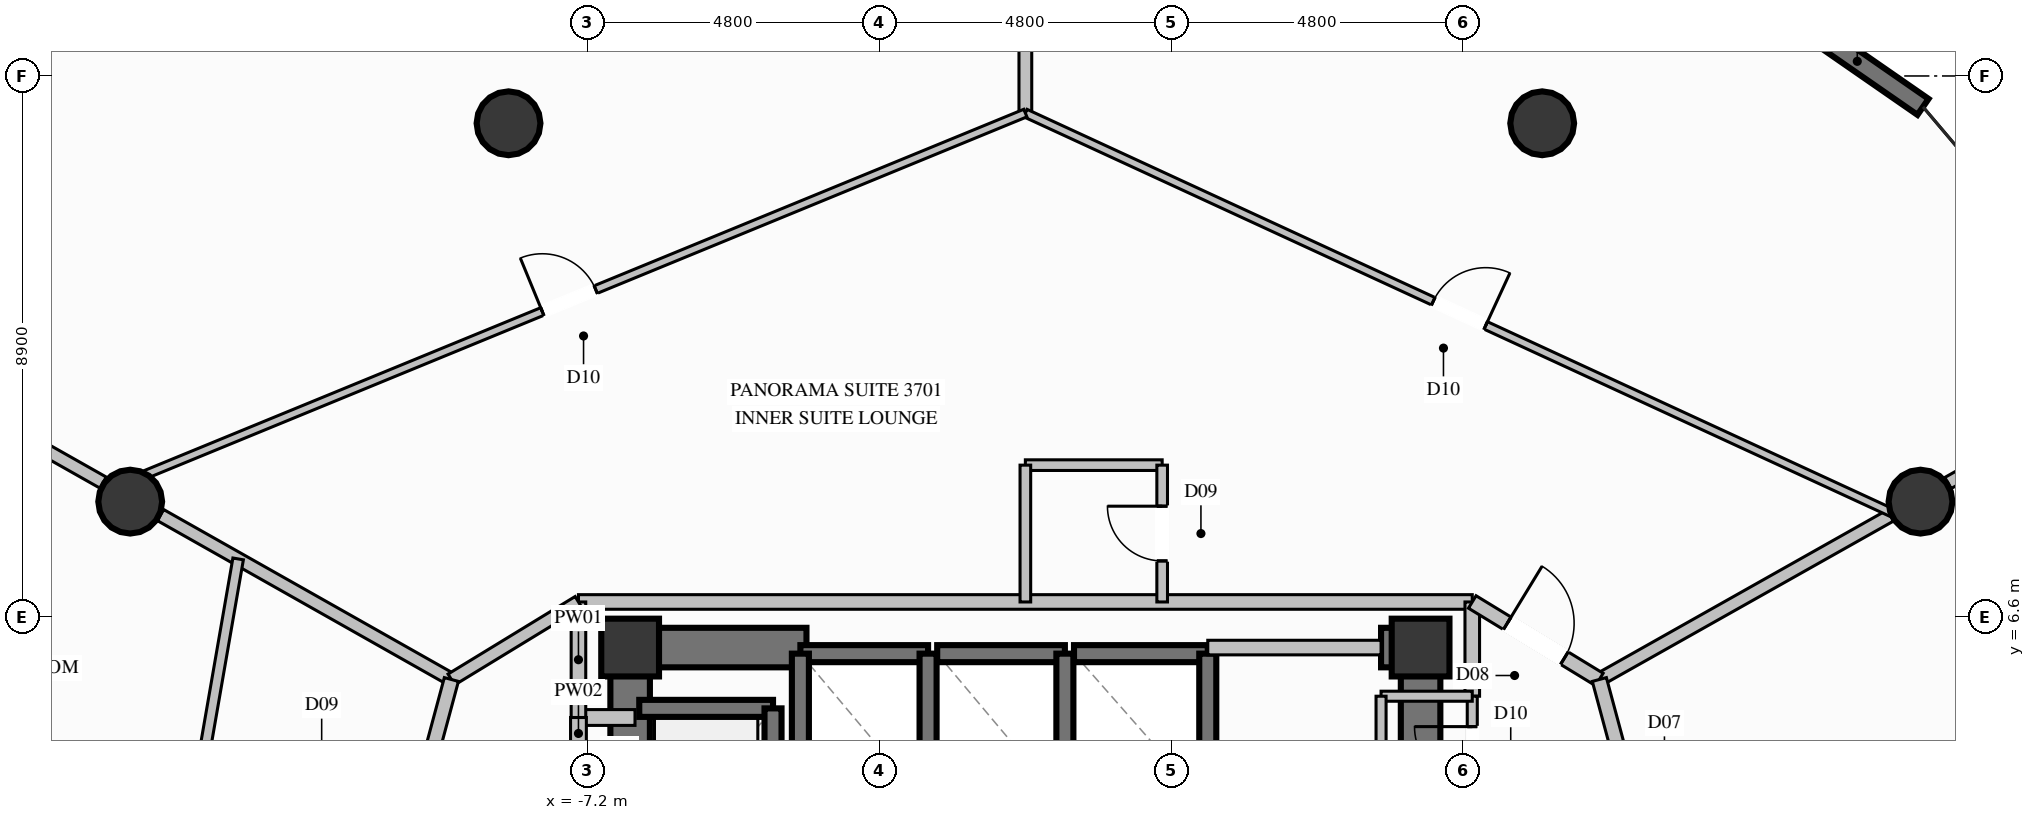
"""IFC4 building model, lengths in metres.
Left out: names, types, materials, properties, quantities, classifications, styles, units other than length and angle.
Written with IfcOpenShell. Run it as: python <this file> out.ifc"""

import sys

from ifc_helpers import new_model, si_unit, direction, frame, frame_2d, origin, origin_2d, place, context, subcontext, project, spatial, rectangle, circle, extrude, element, fill, save


model = new_model("IFC4")
c1 = context("Model", 3, precision=1e-05, world=origin(), true_north=direction((0.0, 1.0)))
c2 = subcontext(c1, "Body", "Model", "MODEL_VIEW")
j1 = project(units=[si_unit("LENGTHUNIT", "METRE"), si_unit("PLANEANGLEUNIT", "RADIAN")], contexts=[c1])
p1 = place(None, origin())
s1 = spatial("IfcSite", under=j1, at=p1, CompositionType="ELEMENT")
p2 = place(p1, origin())
s2 = spatial("IfcBuilding", under=s1, at=p2, CompositionType="ELEMENT")
p3 = place(p2, frame((0.0, 0.0, 138.6)))
s3 = spatial("IfcBuildingStorey", under=s2, at=p3, CompositionType="ELEMENT", Elevation=138.6)
for number, where, z_axis, x_axis in (
    (1, (6.5, 6.1, 0.0), (0.0, 0.0, 1.0), (1.0, 0.0, 0.0)),
    (2, (-6.5, 6.1, 0.0), (0.0, 0.0, 1.0), (1.0, 0.0, 0.0)),
):
    element("IfcColumn", number, at=place(p3, frame(where, z_axis=z_axis, x_axis=x_axis)), inside=s3, PredefinedType="COLUMN", context=c2, shape_type="SweptSolid", body=[
        extrude(rectangle(XDim=0.95, YDim=0.95, at=origin_2d()), origin(), (0.0, 0.0, 1.0), 3.6),
    ])
p4 = place(p3, frame((-6.175, 6.1, 0.0), z_axis=(0.0, 0.0, 1.0), x_axis=(1.0, 0.0, 0.0)))
e3 = element("IfcWall", 3, at=p4, inside=s3, PredefinedType="SHEAR", context=c2, shape_type="SweptSolid", body=[
    extrude(rectangle(XDim=2.575, YDim=0.65, at=frame_2d((1.288, 0.0))), origin(), (0.0, 0.0, 1.0), 3.6),
])
p5 = place(p3, frame((5.85, 6.1, 0.0), z_axis=(0.0, 0.0, 1.0), x_axis=(1.0, 0.0, 0.0)))
e4 = element("IfcWall", 4, at=p5, inside=s3, PredefinedType="SHEAR", context=c2, shape_type="SweptSolid", body=[
    extrude(rectangle(XDim=0.325, YDim=0.65, at=frame_2d((0.163, 0.0))), origin(), (0.0, 0.0, 1.0), 3.6),
])
p6 = place(p3, frame((-6.5, 2.35, 0.0), z_axis=(0.0, 0.0, 1.0), x_axis=(0.0, 1.0, 0.0)))
e5 = element("IfcWall", 5, at=p6, inside=s3, PredefinedType="SHEAR", context=c2, shape_type="SweptSolid", body=[
    extrude(rectangle(XDim=4.075, YDim=0.65, at=frame_2d((2.038, 0.0))), origin(), (0.0, 0.0, 1.0), 3.6),
])
p7 = place(p3, frame((6.5, 3.35, 0.0), z_axis=(0.0, 0.0, 1.0), x_axis=(0.0, 1.0, 0.0)))
e6 = element("IfcWall", 6, at=p7, inside=s3, PredefinedType="SHEAR", context=c2, shape_type="SweptSolid", body=[
    extrude(rectangle(XDim=3.075, YDim=0.65, at=frame_2d((1.538, 0.0))), origin(), (0.0, 0.0, 1.0), 3.6),
])
for number, where, z_axis, x_axis in (
    (7, (14.722, 8.5, 0.0), (0.0, 0.0, 1.0), (1.0, 0.0, 0.0)),
    (8, (8.5, 14.722, 0.0), (0.0, 0.0, 1.0), (1.0, 0.0, 0.0)),
    (9, (-8.5, 14.722, 0.0), (0.0, 0.0, 1.0), (1.0, 0.0, 0.0)),
    (10, (-14.722, 8.5, 0.0), (0.0, 0.0, 1.0), (1.0, 0.0, 0.0)),
):
    element("IfcColumn", number, at=place(p3, frame(where, z_axis=z_axis, x_axis=x_axis)), inside=s3, PredefinedType="COLUMN", context=c2, shape_type="SweptSolid", body=[
        extrude(circle(Radius=0.525, at=origin_2d()), origin(), (0.0, 0.0, 1.0), 3.6),
    ])
p8 = place(p3, frame((8.549, 19.296, 0.0), z_axis=(0.0, 0.0, 1.0), x_axis=(0.822065431331, -0.569393033511, 0.0)))
e11 = element("IfcWall", 11, at=p8, inside=s3, PredefinedType="SOLIDWALL", context=c2, shape_type="SweptSolid", body=[
    extrude(rectangle(XDim=7.559, YDim=0.32, at=frame_2d((3.779, 0.0))), origin(), (0.0, 0.0, 1.0), 3.35),
])
p9 = place(p8, frame((2.879, 0.0, 0.35)))
e12 = element("IfcOpeningElement", 12, at=p9, cuts=e11, PredefinedType="OPENING", context=c2, shape_type="SweptSolid", body=[
    extrude(rectangle(XDim=1.8, YDim=2.6, at=frame_2d((0.9, 1.3))), frame((0.0, 0.17, 0.0), z_axis=(0.0, -1.0, 0.0), x_axis=(1.0, 0.0, 0.0)), (0.0, 0.0, 1.0), 0.34),
])
p10 = place(p3, frame((-1.6, 6.0, 0.0), z_axis=(0.0, 0.0, 1.0), x_axis=(-1.0, 0.0, 0.0)))
e13 = element("IfcWall", 13, at=p10, inside=s3, PredefinedType="SOLIDWALL", context=c2, shape_type="SweptSolid", body=[
    extrude(rectangle(XDim=2.1, YDim=0.28, at=frame_2d((1.05, 0.0))), origin(), (0.0, 0.0, 1.0), 3.35),
])
for number, where, z_axis, x_axis in (
    (14, (-3.7, 6.0, 0.0), (0.0, 0.0, 1.0), (0.0, -1.0, 0.0)),
    (15, (-1.6, 3.5, 0.0), (0.0, 0.0, 1.0), (0.0, 1.0, 0.0)),
):
    element("IfcWall", number, at=place(p3, frame(where, z_axis=z_axis, x_axis=x_axis)), inside=s3, PredefinedType="SOLIDWALL", context=c2, shape_type="SweptSolid", body=[
        extrude(rectangle(XDim=2.5, YDim=0.28, at=frame_2d((1.25, 0.0))), origin(), (0.0, 0.0, 1.0), 3.35),
    ])
p11 = place(p3, frame((0.65, 6.0, 0.0), z_axis=(0.0, 0.0, 1.0), x_axis=(-1.0, 0.0, 0.0)))
e16 = element("IfcWall", 16, at=p11, inside=s3, PredefinedType="SOLIDWALL", context=c2, shape_type="SweptSolid", body=[
    extrude(rectangle(XDim=2.1, YDim=0.28, at=frame_2d((1.05, 0.0))), origin(), (0.0, 0.0, 1.0), 3.35),
])
p12 = place(p3, frame((0.65, 3.5, 0.0), z_axis=(0.0, 0.0, 1.0), x_axis=(0.0, 1.0, 0.0)))
e17 = element("IfcWall", 17, at=p12, inside=s3, PredefinedType="SOLIDWALL", context=c2, shape_type="SweptSolid", body=[
    extrude(rectangle(XDim=2.5, YDim=0.28, at=frame_2d((1.25, 0.0))), origin(), (0.0, 0.0, 1.0), 3.35),
])
p13 = place(p3, frame((3.0, 6.0, 0.0), z_axis=(0.0, 0.0, 1.0), x_axis=(-1.0, 0.0, 0.0)))
e18 = element("IfcWall", 18, at=p13, inside=s3, PredefinedType="SOLIDWALL", context=c2, shape_type="SweptSolid", body=[
    extrude(rectangle(XDim=2.2, YDim=0.28, at=frame_2d((1.1, 0.0))), origin(), (0.0, 0.0, 1.0), 3.35),
])
p14 = place(p3, frame((3.0, 3.5, 0.0), z_axis=(0.0, 0.0, 1.0), x_axis=(0.0, 1.0, 0.0)))
e19 = element("IfcWall", 19, at=p14, inside=s3, PredefinedType="SOLIDWALL", context=c2, shape_type="SweptSolid", body=[
    extrude(rectangle(XDim=2.5, YDim=0.28, at=frame_2d((1.25, 0.0))), origin(), (0.0, 0.0, 1.0), 3.35),
])
p15 = place(p3, frame((-4.15, 5.1, 0.0), z_axis=(0.0, 0.0, 1.0), x_axis=(-1.0, 0.0, 0.0)))
e20 = element("IfcWall", 20, at=p15, inside=s3, PredefinedType="SOLIDWALL", context=c2, shape_type="SweptSolid", body=[
    extrude(rectangle(XDim=2.2, YDim=0.28, at=frame_2d((1.1, 0.0))), origin(), (0.0, 0.0, 1.0), 3.35),
])
p16 = place(p3, frame((-4.15, 2.4, 0.0), z_axis=(0.0, 0.0, 1.0), x_axis=(0.0, 1.0, 0.0)))
e21 = element("IfcWall", 21, at=p16, inside=s3, PredefinedType="SOLIDWALL", context=c2, shape_type="SweptSolid", body=[
    extrude(rectangle(XDim=2.7, YDim=0.28, at=frame_2d((1.35, 0.0))), origin(), (0.0, 0.0, 1.0), 3.35),
])
p17 = place(p3, frame((-7.35, 4.95, 0.0), z_axis=(0.0, 0.0, 1.0), x_axis=(1.0, 0.0, 0.0)))
e22 = element("IfcWall", 22, at=p17, inside=s3, PredefinedType="PARTITIONING", context=c2, shape_type="SweptSolid", body=[
    extrude(rectangle(XDim=0.93, YDim=0.26, at=frame_2d((0.465, 0.0))), origin(), (0.0, 0.0, 1.0), 3.35),
])
p18 = place(p3, frame((-7.35, 2.55, 0.0), z_axis=(0.0, 0.0, 1.0), x_axis=(0.0, 1.0, 0.0)))
e23 = element("IfcWall", 23, at=p18, inside=s3, PredefinedType="PARTITIONING", context=c2, shape_type="SweptSolid", body=[
    extrude(rectangle(XDim=2.4, YDim=0.26, at=frame_2d((1.2, 0.0))), origin(), (0.0, 0.0, 1.0), 2.435),
])
p19 = place(p18, frame((0.775, 0.0, 0.0)))
e24 = element("IfcOpeningElement", 24, at=p19, cuts=e23, PredefinedType="OPENING", context=c2, shape_type="SweptSolid", body=[
    extrude(rectangle(XDim=0.85, YDim=2.05, at=frame_2d((0.425, 1.025))), frame((0.0, 0.14, 0.0), z_axis=(0.0, -1.0, 0.0), x_axis=(1.0, 0.0, 0.0)), (0.0, 0.0, 1.0), 0.28),
])
p20 = place(p3, frame((-7.35, 6.85, 0.0), z_axis=(0.0, 0.0, 1.0), x_axis=(1.0, 0.0, 0.0)))
e25 = element("IfcWall", 25, at=p20, inside=s3, PredefinedType="PARTITIONING", context=c2, shape_type="SweptSolid", body=[
    extrude(rectangle(XDim=14.7, YDim=0.24, at=frame_2d((7.35, 0.0))), origin(), (0.0, 0.0, 1.0), 2.435),
])
p21 = place(p3, frame((-7.35, 4.95, 0.0), z_axis=(0.0, 0.0, 1.0), x_axis=(0.0, 1.0, 0.0)))
e26 = element("IfcWall", 26, at=p21, inside=s3, PredefinedType="PARTITIONING", context=c2, shape_type="SweptSolid", body=[
    extrude(rectangle(XDim=1.9, YDim=0.24, at=frame_2d((0.95, 0.0))), origin(), (0.0, 0.0, 1.0), 2.435),
])
p22 = place(p3, frame((7.35, 5.3, 0.0), z_axis=(0.0, 0.0, 1.0), x_axis=(0.0, 1.0, 0.0)))
e27 = element("IfcWall", 27, at=p22, inside=s3, PredefinedType="PARTITIONING", context=c2, shape_type="SweptSolid", body=[
    extrude(rectangle(XDim=1.55, YDim=0.24, at=frame_2d((0.775, 0.0))), origin(), (0.0, 0.0, 1.0), 2.435),
])
p23 = place(p3, frame((3.0, 6.1, 0.0), z_axis=(0.0, 0.0, 1.0), x_axis=(1.0, 0.0, 0.0)))
e28 = element("IfcWall", 28, at=p23, inside=s3, PredefinedType="PARTITIONING", context=c2, shape_type="SweptSolid", body=[
    extrude(rectangle(XDim=2.85, YDim=0.24, at=frame_2d((1.425, 0.0))), origin(), (0.0, 0.0, 1.0), 2.435),
])
p24 = place(p3, frame((7.35, 3.35, 0.0), z_axis=(0.0, 0.0, 1.0), x_axis=(0.0, 1.0, 0.0)))
e29 = element("IfcWall", 29, at=p24, inside=s3, PredefinedType="PARTITIONING", context=c2, shape_type="SweptSolid", body=[
    extrude(rectangle(XDim=1.95, YDim=0.165, at=frame_2d((0.975, 0.0))), origin(), (0.0, 0.0, 1.0), 3.35),
])
p25 = place(p24, frame((0.5, 0.0, 0.0)))
e30 = element("IfcOpeningElement", 30, at=p25, cuts=e29, PredefinedType="OPENING", context=c2, shape_type="SweptSolid", body=[
    extrude(rectangle(XDim=0.95, YDim=2.1, at=frame_2d((0.475, 1.05))), frame((0.0, 0.093, 0.0), z_axis=(0.0, -1.0, 0.0), x_axis=(1.0, 0.0, 0.0)), (0.0, 0.0, 1.0), 0.185),
])
p26 = place(p3, frame((7.35, 5.3, 0.0), z_axis=(0.0, 0.0, 1.0), x_axis=(-1.0, 0.0, 0.0)))
e31 = element("IfcWall", 31, at=p26, inside=s3, PredefinedType="PARTITIONING", context=c2, shape_type="SweptSolid", body=[
    extrude(rectangle(XDim=1.5, YDim=0.165, at=frame_2d((0.75, 0.0))), origin(), (0.0, 0.0, 1.0), 2.435),
])
p27 = place(p3, frame((5.85, 5.3, 0.0), z_axis=(0.0, 0.0, 1.0), x_axis=(0.0, -1.0, 0.0)))
e32 = element("IfcWall", 32, at=p27, inside=s3, PredefinedType="PARTITIONING", context=c2, shape_type="SweptSolid", body=[
    extrude(rectangle(XDim=1.95, YDim=0.165, at=frame_2d((0.975, 0.0))), origin(), (0.0, 0.0, 1.0), 2.435),
])
p28 = place(p3, frame((9.44, 5.575, 0.0), z_axis=(0.0, 0.0, 1.0), x_axis=(0.871243078021, 0.490851809613, 0.0)))
e33 = element("IfcWall", 33, at=p28, inside=s3, PredefinedType="PARTITIONING", context=c2, shape_type="SweptSolid", body=[
    extrude(rectangle(XDim=5.495, YDim=0.21, at=frame_2d((2.747, 0.0))), origin(), (0.0, 0.0, 1.0), 2.791),
])
p29 = place(p3, frame((15.173, 8.806, 0.0), z_axis=(0.0, 0.0, 1.0), x_axis=(0.871269436628, 0.490805021162, 0.0)))
e34 = element("IfcWall", 34, at=p29, inside=s3, PredefinedType="PARTITIONING", context=c2, shape_type="SweptSolid", body=[
    extrude(rectangle(XDim=3.708, YDim=0.21, at=frame_2d((1.854, 0.0))), origin(), (0.0, 0.0, 1.0), 3.35),
])
p30 = place(p3, frame((-9.44, 5.575, 0.0), z_axis=(0.0, 0.0, 1.0), x_axis=(-0.87056283872, 0.492057256668, 0.0)))
e35 = element("IfcWall", 35, at=p30, inside=s3, PredefinedType="PARTITIONING", context=c2, shape_type="SweptSolid", body=[
    extrude(rectangle(XDim=5.496, YDim=0.21, at=frame_2d((2.748, 0.0))), origin(), (0.0, 0.0, 1.0), 2.791),
])
p31 = place(p3, frame((-15.168, 8.813, 0.0), z_axis=(0.0, 0.0, 1.0), x_axis=(-0.870585270254, 0.492017567997, 0.0)))
e36 = element("IfcWall", 36, at=p31, inside=s3, PredefinedType="PARTITIONING", context=c2, shape_type="SweptSolid", body=[
    extrude(rectangle(XDim=5.27, YDim=0.21, at=frame_2d((2.635, 0.0))), origin(), (0.0, 0.0, 1.0), 3.35),
])
for number, where, z_axis, x_axis in (
    (37, (0.0, 9.1, 0.0), (0.0, 0.0, 1.0), (1.0, 0.0, 0.0)),
    (38, (0.0, 9.1, 0.0), (0.0, 0.0, 1.0), (0.0, -1.0, 0.0)),
):
    element("IfcWall", number, at=place(p3, frame(where, z_axis=z_axis, x_axis=x_axis)), inside=s3, PredefinedType="PLUMBINGWALL", context=c2, shape_type="SweptSolid", body=[
        extrude(rectangle(XDim=2.25, YDim=0.175, at=frame_2d((1.125, 0.0))), origin(), (0.0, 0.0, 1.0), 3.35),
    ])
p32 = place(p3, frame((2.25, 6.85, 0.0), z_axis=(0.0, 0.0, 1.0), x_axis=(0.0, 1.0, 0.0)))
e39 = element("IfcWall", 39, at=p32, inside=s3, PredefinedType="PLUMBINGWALL", context=c2, shape_type="SweptSolid", body=[
    extrude(rectangle(XDim=2.25, YDim=0.175, at=frame_2d((1.125, 0.0))), origin(), (0.0, 0.0, 1.0), 3.35),
])
p33 = place(p32, frame((0.675, 0.0, 0.0)))
e40 = element("IfcOpeningElement", 40, at=p33, cuts=e39, PredefinedType="OPENING", context=c2, shape_type="SweptSolid", body=[
    extrude(rectangle(XDim=0.9, YDim=2.1, at=frame_2d((0.45, 1.05))), frame((0.0, 0.098, 0.0), z_axis=(0.0, -1.0, 0.0), x_axis=(1.0, 0.0, 0.0)), (0.0, 0.0, 1.0), 0.195),
])
p34 = place(p3, frame((-9.44, 5.575, 0.0), z_axis=(0.0, 0.0, 1.0), x_axis=(0.853641534933, 0.520860950579, 0.0)))
e41 = element("IfcWall", 41, at=p34, inside=s3, PredefinedType="PARTITIONING", context=c2, shape_type="SweptSolid", body=[
    extrude(rectangle(XDim=2.448, YDim=0.21, at=frame_2d((1.224, 0.0))), origin(), (0.0, 0.0, 1.0), 3.35),
])
p35 = place(p3, frame((7.35, 6.85, 0.0), z_axis=(0.0, 0.0, 1.0), x_axis=(0.853641534933, -0.520860950579, 0.0)))
e42 = element("IfcWall", 42, at=p35, inside=s3, PredefinedType="PARTITIONING", context=c2, shape_type="SweptSolid", body=[
    extrude(rectangle(XDim=2.448, YDim=0.24, at=frame_2d((1.224, 0.0))), origin(), (0.0, 0.0, 1.0), 3.35),
])
p36 = place(p35, frame((0.674, 0.0, 0.0)))
e43 = element("IfcOpeningElement", 43, at=p36, cuts=e42, PredefinedType="OPENING", context=c2, shape_type="SweptSolid", body=[
    extrude(rectangle(XDim=1.1, YDim=2.3, at=frame_2d((0.55, 1.15))), frame((0.0, 0.13, 0.0), z_axis=(0.0, -1.0, 0.0), x_axis=(1.0, 0.0, 0.0)), (0.0, 0.0, 1.0), 0.26),
])
p37 = place(p3, frame((0.0, 14.89, 0.0), z_axis=(0.0, 0.0, 1.0), x_axis=(0.0, 1.0, 0.0)))
e44 = element("IfcWall", 44, at=p37, inside=s3, PredefinedType="PARTITIONING", context=c2, shape_type="SweptSolid", body=[
    extrude(rectangle(XDim=1.565, YDim=0.21, at=frame_2d((0.783, 0.0))), origin(), (0.0, 0.0, 1.0), 3.35),
])
p38 = place(p3, frame((0.0, 14.89, 0.0), z_axis=(0.0, 0.0, 1.0), x_axis=(0.908063857852, -0.418831744335, 0.0)))
e45 = element("IfcWall", 45, at=p38, inside=s3, PredefinedType="PARTITIONING", context=c2, shape_type="SweptSolid", body=[
    extrude(rectangle(XDim=15.727, YDim=0.135, at=frame_2d((7.863, 0.0))), origin(), (0.0, 0.0, 1.0), 2.878),
])
p39 = place(p38, frame((7.388, 0.0, 0.0)))
e46 = element("IfcOpeningElement", 46, at=p39, cuts=e45, PredefinedType="OPENING", context=c2, shape_type="SweptSolid", body=[
    extrude(rectangle(XDim=0.95, YDim=2.1, at=frame_2d((0.475, 1.05))), frame((0.0, 0.078, 0.0), z_axis=(0.0, -1.0, 0.0), x_axis=(1.0, 0.0, 0.0)), (0.0, 0.0, 1.0), 0.155),
])
p40 = place(p3, frame((-15.011, 8.724, 0.0), z_axis=(0.0, 0.0, 1.0), x_axis=(0.925008016351, 0.379947588078, 0.0)))
e47 = element("IfcWall", 47, at=p40, inside=s3, PredefinedType="PARTITIONING", context=c2, shape_type="SweptSolid", body=[
    extrude(rectangle(XDim=16.228, YDim=0.135, at=frame_2d((8.114, 0.0))), origin(), (0.0, 0.0, 1.0), 2.878),
])
p41 = place(p40, frame((7.639, 0.0, 0.0)))
e48 = element("IfcOpeningElement", 48, at=p41, cuts=e47, PredefinedType="OPENING", context=c2, shape_type="SweptSolid", body=[
    extrude(rectangle(XDim=0.95, YDim=2.1, at=frame_2d((0.475, 1.05))), frame((0.0, 0.078, 0.0), z_axis=(0.0, -1.0, 0.0), x_axis=(1.0, 0.0, 0.0)), (0.0, 0.0, 1.0), 0.155),
])
p42 = place(p3, frame((-9.44, 5.575, 0.0), z_axis=(0.0, 0.0, 1.0), x_axis=(-0.25988439237, -0.965639737481, 0.0)))
e49 = element("IfcWall", 49, at=p42, inside=s3, PredefinedType="PARTITIONING", context=c2, shape_type="SweptSolid", body=[
    extrude(rectangle(XDim=2.359, YDim=0.24, at=frame_2d((1.179, 0.0))), origin(), (0.0, 0.0, 1.0), 3.35),
])
p43 = place(p3, frame((-12.947, 7.558, 0.0), z_axis=(0.0, 0.0, 1.0), x_axis=(-0.171056041303, -0.985261300739, 0.0)))
e50 = element("IfcWall", 50, at=p43, inside=s3, PredefinedType="PLUMBINGWALL", context=c2, shape_type="SweptSolid", body=[
    extrude(rectangle(XDim=3.18, YDim=0.175, at=frame_2d((1.59, 0.0))), origin(), (0.0, 0.0, 1.0), 3.35),
])
p44 = place(p3, frame((10.287, 2.428, 0.0), z_axis=(0.0, 0.0, 1.0), x_axis=(-0.259946608151, 0.965622991084, 0.0)))
e51 = element("IfcWall", 51, at=p44, inside=s3, PredefinedType="PARTITIONING", context=c2, shape_type="SweptSolid", body=[
    extrude(rectangle(XDim=3.259, YDim=0.24, at=frame_2d((1.629, 0.0))), origin(), (0.0, 0.0, 1.0), 3.35),
])
p45 = place(p44, frame((1.129, 0.0, 0.0)))
e52 = element("IfcOpeningElement", 52, at=p45, cuts=e51, PredefinedType="OPENING", context=c2, shape_type="SweptSolid", body=[
    extrude(rectangle(XDim=1.0, YDim=2.2, at=frame_2d((0.5, 1.1))), frame((0.0, 0.13, 0.0), z_axis=(0.0, -1.0, 0.0), x_axis=(1.0, 0.0, 0.0)), (0.0, 0.0, 1.0), 0.26),
])
p46 = place(p25, origin())
e53 = element("IfcDoor", 53, at=p46, inside=s3, OperationType="SINGLE_SWING_RIGHT", PredefinedType="DOOR", context=c2, shape_type="SweptSolid", body=[
    extrude(rectangle(XDim=0.95, YDim=2.1, at=frame_2d((0.475, 1.05))), frame((0.0, 0.025, 0.0), z_axis=(0.0, -1.0, 0.0), x_axis=(1.0, 0.0, 0.0)), (0.0, 0.0, 1.0), 0.05),
])
fill(e30, e53)
p47 = place(p33, origin())
e54 = element("IfcDoor", 54, at=p47, inside=s3, OperationType="SINGLE_SWING_RIGHT", PredefinedType="DOOR", context=c2, shape_type="SweptSolid", body=[
    extrude(rectangle(XDim=0.9, YDim=2.1, at=frame_2d((0.45, 1.05))), frame((0.0, 0.025, 0.0), z_axis=(0.0, -1.0, 0.0), x_axis=(1.0, 0.0, 0.0)), (0.0, 0.0, 1.0), 0.05),
])
fill(e40, e54)
p48 = place(p36, origin())
e55 = element("IfcDoor", 55, at=p48, inside=s3, OperationType="SINGLE_SWING_LEFT", PredefinedType="DOOR", context=c2, shape_type="SweptSolid", body=[
    extrude(rectangle(XDim=1.1, YDim=2.3, at=frame_2d((0.55, 1.15))), frame((0.0, 0.025, 0.0), z_axis=(0.0, -1.0, 0.0), x_axis=(1.0, 0.0, 0.0)), (0.0, 0.0, 1.0), 0.05),
])
fill(e43, e55)
p49 = place(p39, origin())
e56 = element("IfcDoor", 56, at=p49, inside=s3, OperationType="SINGLE_SWING_RIGHT", PredefinedType="DOOR", context=c2, shape_type="SweptSolid", body=[
    extrude(rectangle(XDim=0.95, YDim=2.1, at=frame_2d((0.475, 1.05))), frame((0.0, 0.025, 0.0), z_axis=(0.0, -1.0, 0.0), x_axis=(1.0, 0.0, 0.0)), (0.0, 0.0, 1.0), 0.05),
])
fill(e46, e56)
p50 = place(p41, origin())
e57 = element("IfcDoor", 57, at=p50, inside=s3, OperationType="SINGLE_SWING_LEFT", PredefinedType="DOOR", context=c2, shape_type="SweptSolid", body=[
    extrude(rectangle(XDim=0.95, YDim=2.1, at=frame_2d((0.475, 1.05))), frame((0.0, 0.025, 0.0), z_axis=(0.0, -1.0, 0.0), x_axis=(1.0, 0.0, 0.0)), (0.0, 0.0, 1.0), 0.05),
])
fill(e48, e57)
save(model, sys.argv[1])
